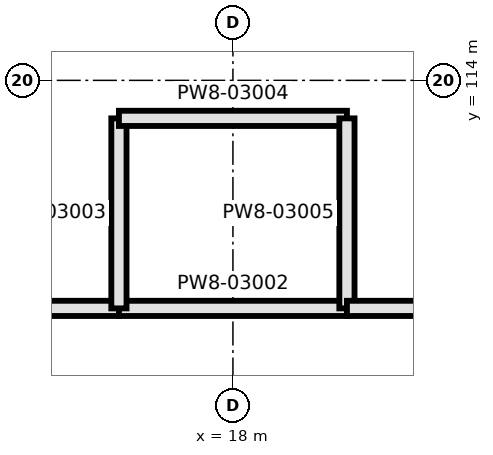
"""IFC4 building model, lengths in metres.
Left out: names, types, materials, properties, quantities, classifications, styles, units other than length and angle.
Written with IfcOpenShell. Run it as: python <this file> out.ifc"""

import sys

from ifc_helpers import new_model, si_unit, direction, frame, frame_2d, origin, place, context, subcontext, project, spatial, rectangle, extrude, element, fill, save


model = new_model("IFC4")
c1 = context("Model", 3, precision=1e-05, world=origin(), true_north=direction((0.0, 1.0)))
c2 = subcontext(c1, "Body", "Model", "MODEL_VIEW")
j1 = project(units=[si_unit("LENGTHUNIT", "METRE"), si_unit("PLANEANGLEUNIT", "RADIAN")], contexts=[c1])
p1 = place(None, origin())
s1 = spatial("IfcSite", under=j1, at=p1, CompositionType="ELEMENT")
p2 = place(p1, origin())
s2 = spatial("IfcBuilding", under=s1, at=p2, CompositionType="ELEMENT")
p3 = place(p2, frame((0.0, 0.0, 16.5)))
s3 = spatial("IfcBuildingStorey", under=s2, at=p3, CompositionType="ELEMENT", Elevation=16.5)
p4 = place(p3, frame((12.37, 111.0, 0.0), z_axis=(0.0, 0.0, 1.0), x_axis=(1.0, 0.0, 0.0)))
e1 = element("IfcWall", 1, at=p4, inside=s3, PredefinedType="PARTITIONING", context=c2, shape_type="SweptSolid", body=[
    extrude(rectangle(XDim=4.13, YDim=0.2, at=frame_2d((2.065, 0.0))), origin(), (0.0, 0.0, 1.0), 6.28),
])
p5 = place(p3, frame((16.5, 111.0, 0.0), z_axis=(0.0, 0.0, 1.0), x_axis=(1.0, 0.0, 0.0)))
e2 = element("IfcWall", 2, at=p5, inside=s3, PredefinedType="PARTITIONING", context=c2, shape_type="SweptSolid", body=[
    extrude(rectangle(XDim=3.0, YDim=0.2, at=frame_2d((1.5, 0.0))), origin(), (0.0, 0.0, 1.0), 6.28),
])
p6 = place(p5, frame((0.85, 0.0, 0.0)))
e3 = element("IfcOpeningElement", 3, at=p6, cuts=e2, PredefinedType="OPENING", context=c2, shape_type="SweptSolid", body=[
    extrude(rectangle(XDim=1.2, YDim=2.1, at=frame_2d((0.6, 1.05))), frame((0.0, 0.11, 0.0), z_axis=(0.0, -1.0, 0.0), x_axis=(1.0, 0.0, 0.0)), (0.0, 0.0, 1.0), 0.22),
])
p7 = place(p3, frame((16.5, 111.0, 0.0), z_axis=(0.0, 0.0, 1.0), x_axis=(0.0, 1.0, 0.0)))
e4 = element("IfcWall", 4, at=p7, inside=s3, PredefinedType="PARTITIONING", context=c2, shape_type="SweptSolid", body=[
    extrude(rectangle(XDim=2.5, YDim=0.2, at=frame_2d((1.25, 0.0))), origin(), (0.0, 0.0, 1.0), 6.28),
])
p8 = place(p3, frame((16.5, 113.5, 0.0), z_axis=(0.0, 0.0, 1.0), x_axis=(1.0, 0.0, 0.0)))
e5 = element("IfcWall", 5, at=p8, inside=s3, PredefinedType="PARTITIONING", context=c2, shape_type="SweptSolid", body=[
    extrude(rectangle(XDim=3.0, YDim=0.2, at=frame_2d((1.5, 0.0))), origin(), (0.0, 0.0, 1.0), 6.28),
])
p9 = place(p8, frame((0.55, 0.0, 0.0)))
e6 = element("IfcOpeningElement", 6, at=p9, cuts=e5, PredefinedType="OPENING", context=c2, shape_type="SweptSolid", body=[
    extrude(rectangle(XDim=1.8, YDim=2.1, at=frame_2d((0.9, 1.05))), frame((0.0, 0.11, 0.0), z_axis=(0.0, -1.0, 0.0), x_axis=(1.0, 0.0, 0.0)), (0.0, 0.0, 1.0), 0.22),
])
p10 = place(p3, frame((19.5, 111.0, 0.0), z_axis=(0.0, 0.0, 1.0), x_axis=(0.0, 1.0, 0.0)))
e7 = element("IfcWall", 7, at=p10, inside=s3, PredefinedType="PARTITIONING", context=c2, shape_type="SweptSolid", body=[
    extrude(rectangle(XDim=2.5, YDim=0.2, at=frame_2d((1.25, 0.0))), origin(), (0.0, 0.0, 1.0), 6.28),
])
p11 = place(p3, frame((19.5, 111.0, 0.0), z_axis=(0.0, 0.0, 1.0), x_axis=(1.0, 0.0, 0.0)))
e8 = element("IfcWall", 8, at=p11, inside=s3, PredefinedType="PARTITIONING", context=c2, shape_type="SweptSolid", body=[
    extrude(rectangle(XDim=4.5, YDim=0.2, at=frame_2d((2.25, 0.0))), origin(), (0.0, 0.0, 1.0), 6.28),
])
p12 = place(p6, origin())
e9 = element("IfcDoor", 9, at=p12, inside=s3, OperationType="DOUBLE_DOOR_SINGLE_SWING", PredefinedType="DOOR", context=c2, shape_type="SweptSolid", body=[
    extrude(rectangle(XDim=1.2, YDim=2.1, at=frame_2d((0.6, 1.05))), frame((0.0, 0.025, 0.0), z_axis=(0.0, -1.0, 0.0), x_axis=(1.0, 0.0, 0.0)), (0.0, 0.0, 1.0), 0.05),
])
fill(e3, e9)
p13 = place(p9, frame((1.8, 0.0, 0.0), z_axis=(0.0, 0.0, 1.0), x_axis=(-1.0, 0.0, 0.0)))
e10 = element("IfcDoor", 10, at=p13, inside=s3, OperationType="DOUBLE_DOOR_SINGLE_SWING", PredefinedType="DOOR", context=c2, shape_type="SweptSolid", body=[
    extrude(rectangle(XDim=1.8, YDim=2.1, at=frame_2d((0.9, 1.05))), frame((0.0, 0.025, 0.0), z_axis=(0.0, -1.0, 0.0), x_axis=(1.0, 0.0, 0.0)), (0.0, 0.0, 1.0), 0.05),
])
fill(e6, e10)
save(model, sys.argv[1])
